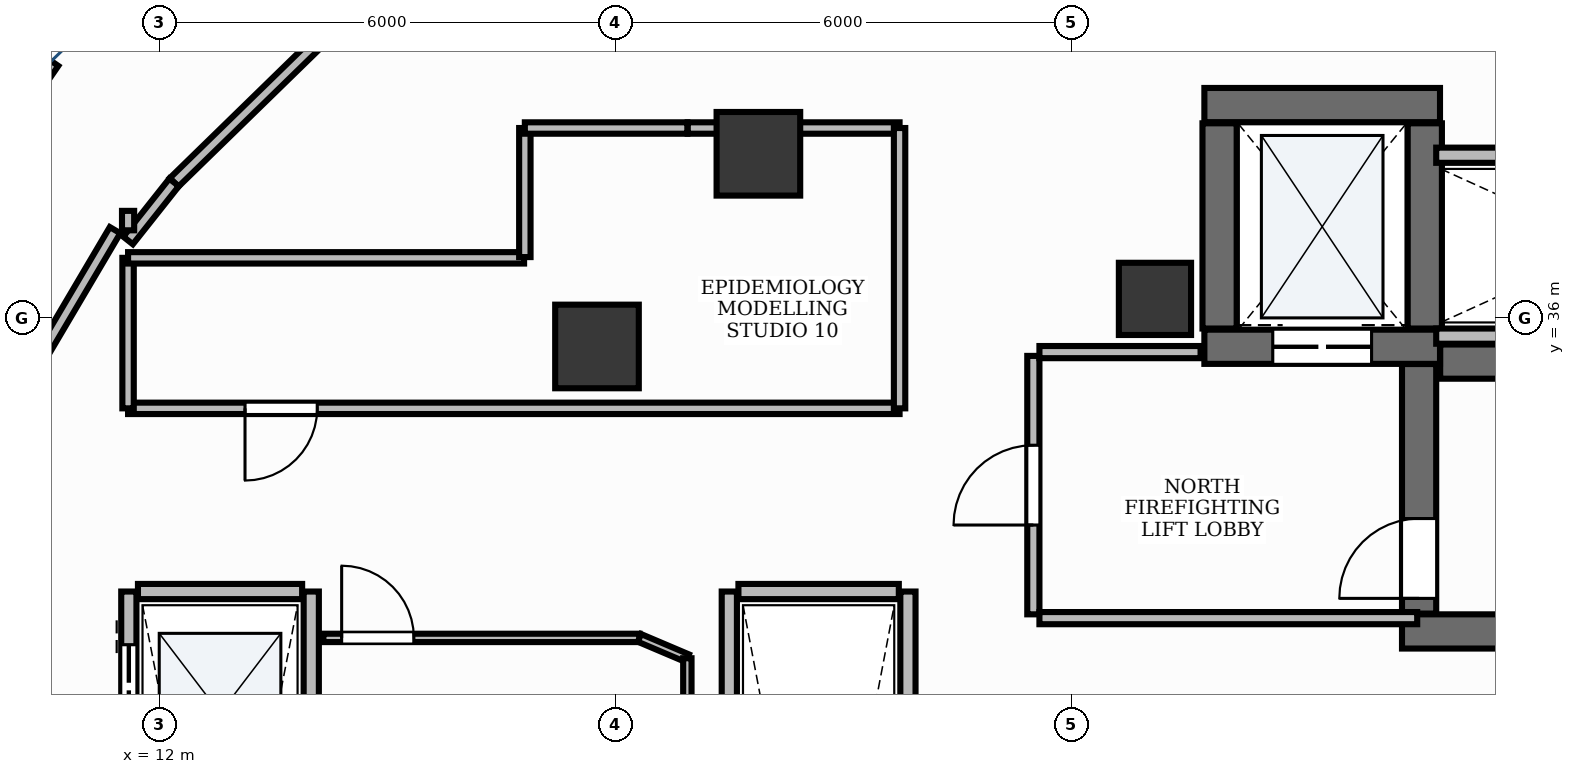
"""IFC4 building model, lengths in metres.
Left out: names, types, materials, properties, quantities, classifications, styles, units other than length and angle.
Written with IfcOpenShell. Run it as: python <this file> out.ifc"""

import sys

from ifc_helpers import new_model, si_unit, direction, frame, frame_2d, origin, origin_2d, place, context, subcontext, project, spatial, rectangle, extrude, element, fill, save


model = new_model("IFC4")
c1 = context("Model", 3, precision=1e-05, world=origin(), true_north=direction((0.0, 1.0)))
c2 = subcontext(c1, "Body", "Model", "MODEL_VIEW")
j1 = project(units=[si_unit("LENGTHUNIT", "METRE"), si_unit("PLANEANGLEUNIT", "RADIAN")], contexts=[c1])
p1 = place(None, origin())
s1 = spatial("IfcSite", under=j1, at=p1, CompositionType="ELEMENT")
p2 = place(p1, origin())
s2 = spatial("IfcBuilding", under=s1, at=p2, CompositionType="ELEMENT")
p3 = place(p2, frame((0.0, 0.0, 90.0)))
s3 = spatial("IfcBuildingStorey", under=s2, at=p3, CompositionType="ELEMENT", Elevation=90.0)
p4 = place(p3, frame((28.852, 35.425, 0.0), z_axis=(0.0, 0.0, 1.0), x_axis=(1.0, 0.0, 0.0)))
e1 = element("IfcWall", 1, at=p4, inside=s3, PredefinedType="SHEAR", context=c2, shape_type="SweptSolid", body=[
    extrude(rectangle(XDim=8.248, YDim=0.45, at=frame_2d((4.124, 0.0))), origin(), (0.0, 0.0, 1.0), 3.9),
])
p5 = place(p3, frame((28.35, 31.875, 0.0), z_axis=(0.0, 0.0, 1.0), x_axis=(1.0, 0.0, 0.0)))
e2 = element("IfcWall", 2, at=p5, inside=s3, PredefinedType="SHEAR", context=c2, shape_type="SweptSolid", body=[
    extrude(rectangle(XDim=8.75, YDim=0.45, at=frame_2d((4.375, 0.0))), origin(), (0.0, 0.0, 1.0), 3.9),
])
p6 = place(p3, frame((28.575, 32.11, 0.0), z_axis=(0.0, 0.0, 1.0), x_axis=(0.0, 1.0, 0.0)))
e3 = element("IfcWall", 3, at=p6, inside=s3, PredefinedType="SHEAR", context=c2, shape_type="SweptSolid", body=[
    extrude(rectangle(XDim=3.283, YDim=0.45, at=frame_2d((1.642, 0.0))), origin(), (0.0, 0.0, 1.0), 3.9),
])
p7 = place(p6, frame((0.2, 0.0, 0.0)))
e4 = element("IfcOpeningElement", 4, at=p7, cuts=e3, PredefinedType="OPENING", context=c2, shape_type="SweptSolid", body=[
    extrude(rectangle(XDim=1.05, YDim=2.15, at=frame_2d((0.525, 1.075))), frame((0.0, 0.24, 0.0), z_axis=(0.0, -1.0, 0.0), x_axis=(1.0, 0.0, 0.0)), (0.0, 0.0, 1.0), 0.48),
])
p8 = place(p3, frame((25.75, 38.8, 0.0), z_axis=(0.0, 0.0, 1.0), x_axis=(1.0, 0.0, 0.0)))
e5 = element("IfcWall", 5, at=p8, inside=s3, PredefinedType="SHEAR", context=c2, shape_type="SweptSolid", body=[
    extrude(rectangle(XDim=3.1, YDim=0.45, at=frame_2d((1.55, 0.0))), origin(), (0.0, 0.0, 1.0), 3.9),
])
p9 = place(p3, frame((25.75, 35.62, 0.0), z_axis=(0.0, 0.0, 1.0), x_axis=(1.0, 0.0, 0.0)))
e6 = element("IfcWall", 6, at=p9, inside=s3, PredefinedType="SHEAR", context=c2, shape_type="SweptSolid", body=[
    extrude(rectangle(XDim=3.1, YDim=0.45, at=frame_2d((1.55, 0.0))), origin(), (0.0, 0.0, 1.0), 3.9),
])
p10 = place(p9, frame((0.9, 0.0, 0.0)))
e7 = element("IfcOpeningElement", 7, at=p10, cuts=e6, PredefinedType="OPENING", context=c2, shape_type="SweptSolid", body=[
    extrude(rectangle(XDim=1.3, YDim=2.2, at=frame_2d((0.65, 1.1))), frame((0.0, 0.24, 0.0), z_axis=(0.0, -1.0, 0.0), x_axis=(1.0, 0.0, 0.0)), (0.0, 0.0, 1.0), 0.48),
])
for number, where, z_axis, x_axis in (
    (8, (25.95, 35.86, 0.0), (0.0, 0.0, 1.0), (0.0, 1.0, 0.0)),
    (9, (28.65, 35.86, 0.0), (0.0, 0.0, 1.0), (0.0, 1.0, 0.0)),
):
    element("IfcWall", number, at=place(p3, frame(where, z_axis=z_axis, x_axis=x_axis)), inside=s3, PredefinedType="SHEAR", context=c2, shape_type="SweptSolid", body=[
        extrude(rectangle(XDim=2.7, YDim=0.45, at=frame_2d((1.35, 0.0))), origin(), (0.0, 0.0, 1.0), 3.9),
    ])
p11 = place(p3, frame((25.1, 36.25, -0.0), z_axis=(0.0, 0.0, 1.0), x_axis=(1.0, 0.0, 0.0)))
e10 = element("IfcColumn", 10, at=p11, inside=s3, PredefinedType="PILASTER", context=c2, shape_type="SweptSolid", body=[
    extrude(rectangle(XDim=0.95, YDim=0.95, at=origin_2d()), origin(), (0.0, 0.0, 1.0), 3.901),
])
for number, where, z_axis, x_axis in (
    (11, (19.883, 38.159, -0.0), (0.0, 0.0, 1.0), (1.0, 0.0, 0.0)),
    (12, (17.759, 35.624, -0.0), (0.0, 0.0, 1.0), (1.0, 0.0, 0.0)),
):
    element("IfcColumn", number, at=place(p3, frame(where, z_axis=z_axis, x_axis=x_axis)), inside=s3, PredefinedType="COLUMN", context=c2, shape_type="SweptSolid", body=[
        extrude(rectangle(XDim=1.1, YDim=1.1, at=origin_2d()), origin(), (0.0, 0.0, 1.0), 3.901),
    ])
p12 = place(p3, frame((10.548, 39.4, 0.0), z_axis=(0.0, 0.0, 1.0), x_axis=(-0.566825798999, -0.823837674296, 0.0)))
e13 = element("IfcWall", 13, at=p12, inside=s3, PredefinedType="STANDARD", context=c2, shape_type="SweptSolid", body=[
    extrude(rectangle(XDim=5.826, YDim=0.3, at=frame_2d((2.913, 0.0))), origin(), (0.0, 0.0, 1.0), 3.47),
])
p13 = place(p3, frame((11.6, 21.6, 0.0), z_axis=(0.0, 0.0, 1.0), x_axis=(0.0, 1.0, 0.0)))
e14 = element("IfcWall", 14, at=p13, inside=s3, PredefinedType="PARTITIONING", context=c2, shape_type="SweptSolid", body=[
    extrude(rectangle(XDim=10.8, YDim=0.2, at=frame_2d((5.4, 0.0))), origin(), (0.0, 0.0, 1.0), 2.91),
])
p14 = place(p13, frame((0.9, 0.0, 0.0)))
e15 = element("IfcOpeningElement", 15, at=p14, cuts=e14, PredefinedType="OPENING", context=c2, shape_type="SweptSolid", body=[
    extrude(rectangle(XDim=1.1, YDim=2.2, at=frame_2d((0.55, 1.1))), frame((0.0, 0.115, 0.0), z_axis=(0.0, -1.0, 0.0), x_axis=(1.0, 0.0, 0.0)), (0.0, 0.0, 1.0), 0.23),
])
p15 = place(p13, frame((3.6, 0.0, 0.0)))
e16 = element("IfcOpeningElement", 16, at=p15, cuts=e14, PredefinedType="OPENING", context=c2, shape_type="SweptSolid", body=[
    extrude(rectangle(XDim=1.1, YDim=2.2, at=frame_2d((0.55, 1.1))), frame((0.0, 0.115, 0.0), z_axis=(0.0, -1.0, 0.0), x_axis=(1.0, 0.0, 0.0)), (0.0, 0.0, 1.0), 0.23),
])
p16 = place(p13, frame((6.3, 0.0, 0.0)))
e17 = element("IfcOpeningElement", 17, at=p16, cuts=e14, PredefinedType="OPENING", context=c2, shape_type="SweptSolid", body=[
    extrude(rectangle(XDim=1.1, YDim=2.2, at=frame_2d((0.55, 1.1))), frame((0.0, 0.115, 0.0), z_axis=(0.0, -1.0, 0.0), x_axis=(1.0, 0.0, 0.0)), (0.0, 0.0, 1.0), 0.23),
])
p17 = place(p13, frame((9.0, 0.0, 0.0)))
e18 = element("IfcOpeningElement", 18, at=p17, cuts=e14, PredefinedType="OPENING", context=c2, shape_type="SweptSolid", body=[
    extrude(rectangle(XDim=1.1, YDim=2.2, at=frame_2d((0.55, 1.1))), frame((0.0, 0.115, 0.0), z_axis=(0.0, -1.0, 0.0), x_axis=(1.0, 0.0, 0.0)), (0.0, 0.0, 1.0), 0.23),
])
p18 = place(p3, frame((14.0, 21.6, 0.0), z_axis=(0.0, 0.0, 1.0), x_axis=(0.0, 1.0, 0.0)))
e19 = element("IfcWall", 19, at=p18, inside=s3, PredefinedType="PARTITIONING", context=c2, shape_type="SweptSolid", body=[
    extrude(rectangle(XDim=10.8, YDim=0.2, at=frame_2d((5.4, 0.0))), origin(), (0.0, 0.0, 1.0), 2.91),
])
p19 = place(p3, frame((11.72, 32.4, 0.0), z_axis=(0.0, 0.0, 1.0), x_axis=(1.0, 0.0, 0.0)))
e20 = element("IfcWall", 20, at=p19, inside=s3, PredefinedType="PARTITIONING", context=c2, shape_type="SweptSolid", body=[
    extrude(rectangle(XDim=2.16, YDim=0.2, at=frame_2d((1.08, 0.0))), origin(), (0.0, 0.0, 1.0), 2.91),
])
for number, where, z_axis, x_axis in (
    (21, (19.5, 21.6, 0.0), (0.0, 0.0, 1.0), (0.0, 1.0, 0.0)),
    (22, (21.85, 21.6, 0.0), (0.0, 0.0, 1.0), (0.0, 1.0, 0.0)),
):
    element("IfcWall", number, at=place(p3, frame(where, z_axis=z_axis, x_axis=x_axis)), inside=s3, PredefinedType="PARTITIONING", context=c2, shape_type="SweptSolid", body=[
        extrude(rectangle(XDim=10.8, YDim=0.2, at=frame_2d((5.4, 0.0))), origin(), (0.0, 0.0, 1.0), 2.91),
    ])
p20 = place(p3, frame((19.62, 32.4, 0.0), z_axis=(0.0, 0.0, 1.0), x_axis=(1.0, 0.0, 0.0)))
e23 = element("IfcWall", 23, at=p20, inside=s3, PredefinedType="PARTITIONING", context=c2, shape_type="SweptSolid", body=[
    extrude(rectangle(XDim=2.11, YDim=0.2, at=frame_2d((1.055, 0.0))), origin(), (0.0, 0.0, 1.0), 2.91),
])
for number, where, z_axis, x_axis in (
    (24, (28.8, 35.76, 0.0), (0.0, 0.0, 1.0), (1.0, 0.0, 0.0)),
    (25, (28.8, 38.14, 0.0), (0.0, 0.0, 1.0), (1.0, 0.0, 0.0)),
):
    element("IfcWall", number, at=place(p3, frame(where, z_axis=z_axis, x_axis=x_axis)), inside=s3, PredefinedType="PARTITIONING", context=c2, shape_type="SweptSolid", body=[
        extrude(rectangle(XDim=4.57, YDim=0.2, at=frame_2d((2.285, 0.0))), origin(), (0.0, 0.0, 1.0), 2.91),
    ])
p21 = place(p3, frame((23.5, 32.1, 0.0), z_axis=(0.0, 0.0, 1.0), x_axis=(0.0, 1.0, 0.0)))
e26 = element("IfcWall", 26, at=p21, inside=s3, PredefinedType="PARTITIONING", context=c2, shape_type="SweptSolid", body=[
    extrude(rectangle(XDim=3.4, YDim=0.16, at=frame_2d((1.7, 0.0))), origin(), (0.0, 0.0, 1.0), 2.91),
])
p22 = place(p21, frame((1.175, 0.0, 0.0)))
e27 = element("IfcOpeningElement", 27, at=p22, cuts=e26, PredefinedType="OPENING", context=c2, shape_type="SweptSolid", body=[
    extrude(rectangle(XDim=1.05, YDim=2.15, at=frame_2d((0.525, 1.075))), frame((0.0, 0.095, 0.0), z_axis=(0.0, -1.0, 0.0), x_axis=(1.0, 0.0, 0.0)), (0.0, 0.0, 1.0), 0.19),
])
p23 = place(p3, frame((23.58, 32.05, 0.0), z_axis=(0.0, 0.0, 1.0), x_axis=(1.0, 0.0, 0.0)))
e28 = element("IfcWall", 28, at=p23, inside=s3, PredefinedType="PARTITIONING", context=c2, shape_type="SweptSolid", body=[
    extrude(rectangle(XDim=4.97, YDim=0.16, at=frame_2d((2.485, 0.0))), origin(), (0.0, 0.0, 1.0), 2.91),
])
p24 = place(p3, frame((23.58, 35.55, 0.0), z_axis=(0.0, 0.0, 1.0), x_axis=(1.0, 0.0, 0.0)))
e29 = element("IfcWall", 29, at=p24, inside=s3, PredefinedType="PARTITIONING", context=c2, shape_type="SweptSolid", body=[
    extrude(rectangle(XDim=2.12, YDim=0.16, at=frame_2d((1.06, 0.0))), origin(), (0.0, 0.0, 1.0), 2.91),
])
p25 = place(p3, frame((21.74, 34.81, 0.0), z_axis=(0.0, 0.0, 1.0), x_axis=(-1.0, 0.0, 0.0)))
e30 = element("IfcWall", 30, at=p25, inside=s3, PredefinedType="PARTITIONING", context=c2, shape_type="SweptSolid", body=[
    extrude(rectangle(XDim=10.15, YDim=0.15, at=frame_2d((5.075, 0.0))), origin(), (0.0, 0.0, 1.0), 2.91),
])
p26 = place(p25, frame((7.662, 0.0, 0.0)))
e31 = element("IfcOpeningElement", 31, at=p26, cuts=e30, PredefinedType="OPENING", context=c2, shape_type="SweptSolid", body=[
    extrude(rectangle(XDim=0.95, YDim=2.15, at=frame_2d((0.475, 1.075))), frame((0.0, 0.09, 0.0), z_axis=(0.0, -1.0, 0.0), x_axis=(1.0, 0.0, 0.0)), (0.0, 0.0, 1.0), 0.18),
])
p27 = place(p3, frame((14.16, 31.79, 0.0), z_axis=(0.0, 0.0, 1.0), x_axis=(1.0, 0.0, 0.0)))
e32 = element("IfcWall", 32, at=p27, inside=s3, PredefinedType="MOVABLE", context=c2, shape_type="SweptSolid", body=[
    extrude(rectangle(XDim=4.158, YDim=0.11, at=frame_2d((2.079, 0.0))), origin(), (0.0, 0.0, 1.0), 2.91),
])
p28 = place(p27, frame((0.24, 0.0, 0.0)))
e33 = element("IfcOpeningElement", 33, at=p28, cuts=e32, PredefinedType="OPENING", context=c2, shape_type="SweptSolid", body=[
    extrude(rectangle(XDim=0.95, YDim=2.15, at=frame_2d((0.475, 1.075))), frame((0.0, 0.07, 0.0), z_axis=(0.0, -1.0, 0.0), x_axis=(1.0, 0.0, 0.0)), (0.0, 0.0, 1.0), 0.14),
])
p29 = place(p3, frame((14.114, 39.653, 0.0), z_axis=(0.0, 0.0, 1.0), x_axis=(-0.716161838398, -0.697934252794, 0.0)))
e34 = element("IfcWall", 34, at=p29, inside=s3, PredefinedType="PARTITIONING", context=c2, shape_type="SweptSolid", body=[
    extrude(rectangle(XDim=2.679, YDim=0.16, at=frame_2d((1.339, 0.0))), origin(), (0.0, 0.0, 1.0), 2.91),
])
p30 = place(p3, frame((12.195, 37.782, 0.0), z_axis=(0.0, 0.0, 1.0), x_axis=(-0.621081637991, -0.783745876513, 0.0)))
e35 = element("IfcWall", 35, at=p30, inside=s3, PredefinedType="PARTITIONING", context=c2, shape_type="SweptSolid", body=[
    extrude(rectangle(XDim=0.974, YDim=0.16, at=frame_2d((0.487, 0.0))), origin(), (0.0, 0.0, 1.0), 2.91),
])
p31 = place(p3, frame((11.59, 37.152, 0.0), z_axis=(0.0, 0.0, 1.0), x_axis=(0.0, 1.0, 0.0)))
e36 = element("IfcWall", 36, at=p31, inside=s3, PredefinedType="PARTITIONING", context=c2, shape_type="SweptSolid", body=[
    extrude(rectangle(XDim=0.256, YDim=0.16, at=frame_2d((0.128, 0.0))), origin(), (0.0, 0.0, 1.0), 2.91),
])
p32 = place(p3, frame((11.419, 37.154, 0.0), z_axis=(0.0, 0.0, 1.0), x_axis=(-0.508183269016, -0.861248956511, 0.0)))
e37 = element("IfcWall", 37, at=p32, inside=s3, PredefinedType="PARTITIONING", context=c2, shape_type="SweptSolid", body=[
    extrude(rectangle(XDim=4.053, YDim=0.16, at=frame_2d((2.026, 0.0))), origin(), (0.0, 0.0, 1.0), 2.91),
])
p33 = place(p3, frame((18.952, 38.498, 0.0), z_axis=(0.0, 0.0, 1.0), x_axis=(1.0, 0.0, 0.0)))
e38 = element("IfcWall", 38, at=p33, inside=s3, PredefinedType="PARTITIONING", context=c2, shape_type="SweptSolid", body=[
    extrude(rectangle(XDim=2.788, YDim=0.15, at=frame_2d((1.394, 0.0))), origin(), (0.0, 0.0, 1.0), 2.91),
])
p34 = place(p3, frame((21.74, 38.498, 0.0), z_axis=(0.0, 0.0, 1.0), x_axis=(0.0, -1.0, 0.0)))
e39 = element("IfcWall", 39, at=p34, inside=s3, PredefinedType="PARTITIONING", context=c2, shape_type="SweptSolid", body=[
    extrude(rectangle(XDim=3.688, YDim=0.15, at=frame_2d((1.844, 0.0))), origin(), (0.0, 0.0, 1.0), 2.91),
])
p35 = place(p3, frame((11.59, 34.81, 0.0), z_axis=(0.0, 0.0, 1.0), x_axis=(0.0, 1.0, 0.0)))
e40 = element("IfcWall", 40, at=p35, inside=s3, PredefinedType="PARTITIONING", context=c2, shape_type="SweptSolid", body=[
    extrude(rectangle(XDim=1.98, YDim=0.15, at=frame_2d((0.99, 0.0))), origin(), (0.0, 0.0, 1.0), 2.91),
])
p36 = place(p3, frame((11.59, 36.79, 0.0), z_axis=(0.0, 0.0, 1.0), x_axis=(1.0, 0.0, 0.0)))
e41 = element("IfcWall", 41, at=p36, inside=s3, PredefinedType="PARTITIONING", context=c2, shape_type="SweptSolid", body=[
    extrude(rectangle(XDim=5.21, YDim=0.15, at=frame_2d((2.605, 0.0))), origin(), (0.0, 0.0, 1.0), 2.91),
])
p37 = place(p3, frame((16.81, 36.8, 0.0), z_axis=(0.0, 0.0, 1.0), x_axis=(0.0, 1.0, 0.0)))
e42 = element("IfcWall", 42, at=p37, inside=s3, PredefinedType="PARTITIONING", context=c2, shape_type="SweptSolid", body=[
    extrude(rectangle(XDim=1.698, YDim=0.15, at=frame_2d((0.849, 0.0))), origin(), (0.0, 0.0, 1.0), 2.91),
])
p38 = place(p3, frame((16.81, 38.498, 0.0), z_axis=(0.0, 0.0, 1.0), x_axis=(1.0, 0.0, 0.0)))
e43 = element("IfcWall", 43, at=p38, inside=s3, PredefinedType="PARTITIONING", context=c2, shape_type="SweptSolid", body=[
    extrude(rectangle(XDim=2.138, YDim=0.15, at=frame_2d((1.069, 0.0))), origin(), (0.0, 0.0, 1.0), 2.91),
])
p39 = place(p3, frame((18.318, 31.79, 0.0), z_axis=(0.0, 0.0, 1.0), x_axis=(0.920523463189, -0.390687283795, 0.0)))
e44 = element("IfcWall", 44, at=p39, inside=s3, PredefinedType="MOVABLE", context=c2, shape_type="SweptSolid", body=[
    extrude(rectangle(XDim=0.684, YDim=0.11, at=frame_2d((0.342, 0.0))), origin(), (0.0, 0.0, 1.0), 2.91),
])
p40 = place(p3, frame((18.948, 31.522, 0.0), z_axis=(0.0, 0.0, 1.0), x_axis=(0.0, -1.0, 0.0)))
e45 = element("IfcWall", 45, at=p40, inside=s3, PredefinedType="MOVABLE", context=c2, shape_type="SweptSolid", body=[
    extrude(rectangle(XDim=3.475, YDim=0.11, at=frame_2d((1.738, 0.0))), origin(), (0.0, 0.0, 1.0), 2.91),
])
p41 = place(p7, origin())
e46 = element("IfcDoor", 46, at=p41, inside=s3, OperationType="SINGLE_SWING_LEFT", PredefinedType="DOOR", context=c2, shape_type="SweptSolid", body=[
    extrude(rectangle(XDim=1.05, YDim=2.15, at=frame_2d((0.525, 1.075))), frame((0.0, 0.025, 0.0), z_axis=(0.0, -1.0, 0.0), x_axis=(1.0, 0.0, 0.0)), (0.0, 0.0, 1.0), 0.05),
])
fill(e4, e46)
p42 = place(p17, origin())
e47 = element("IfcDoor", 47, at=p42, inside=s3, OperationType="DOUBLE_DOOR_SLIDING", PredefinedType="DOOR", context=c2, shape_type="SweptSolid", body=[
    extrude(rectangle(XDim=1.1, YDim=2.2, at=frame_2d((0.55, 1.1))), frame((0.0, 0.025, 0.0), z_axis=(0.0, -1.0, 0.0), x_axis=(1.0, 0.0, 0.0)), (0.0, 0.0, 1.0), 0.05),
])
fill(e18, e47)
p43 = place(p10, origin())
e48 = element("IfcDoor", 48, at=p43, inside=s3, OperationType="DOUBLE_DOOR_SLIDING", PredefinedType="DOOR", context=c2, shape_type="SweptSolid", body=[
    extrude(rectangle(XDim=1.3, YDim=2.2, at=frame_2d((0.65, 1.1))), frame((0.0, 0.025, 0.0), z_axis=(0.0, -1.0, 0.0), x_axis=(1.0, 0.0, 0.0)), (0.0, 0.0, 1.0), 0.05),
])
fill(e7, e48)
p44 = place(p22, origin())
e49 = element("IfcDoor", 49, at=p44, inside=s3, OperationType="SINGLE_SWING_LEFT", PredefinedType="DOOR", context=c2, shape_type="SweptSolid", body=[
    extrude(rectangle(XDim=1.05, YDim=2.15, at=frame_2d((0.525, 1.075))), frame((0.0, 0.025, 0.0), z_axis=(0.0, -1.0, 0.0), x_axis=(1.0, 0.0, 0.0)), (0.0, 0.0, 1.0), 0.05),
])
fill(e27, e49)
p45 = place(p26, origin())
e50 = element("IfcDoor", 50, at=p45, inside=s3, OperationType="SINGLE_SWING_RIGHT", PredefinedType="DOOR", context=c2, shape_type="SweptSolid", body=[
    extrude(rectangle(XDim=0.95, YDim=2.15, at=frame_2d((0.475, 1.075))), frame((0.0, 0.025, 0.0), z_axis=(0.0, -1.0, 0.0), x_axis=(1.0, 0.0, 0.0)), (0.0, 0.0, 1.0), 0.05),
])
fill(e31, e50)
p46 = place(p28, origin())
e51 = element("IfcDoor", 51, at=p46, inside=s3, OperationType="SINGLE_SWING_LEFT", PredefinedType="DOOR", context=c2, shape_type="SweptSolid", body=[
    extrude(rectangle(XDim=0.95, YDim=2.15, at=frame_2d((0.475, 1.075))), frame((0.0, 0.025, 0.0), z_axis=(0.0, -1.0, 0.0), x_axis=(1.0, 0.0, 0.0)), (0.0, 0.0, 1.0), 0.05),
])
fill(e33, e51)
save(model, sys.argv[1])
